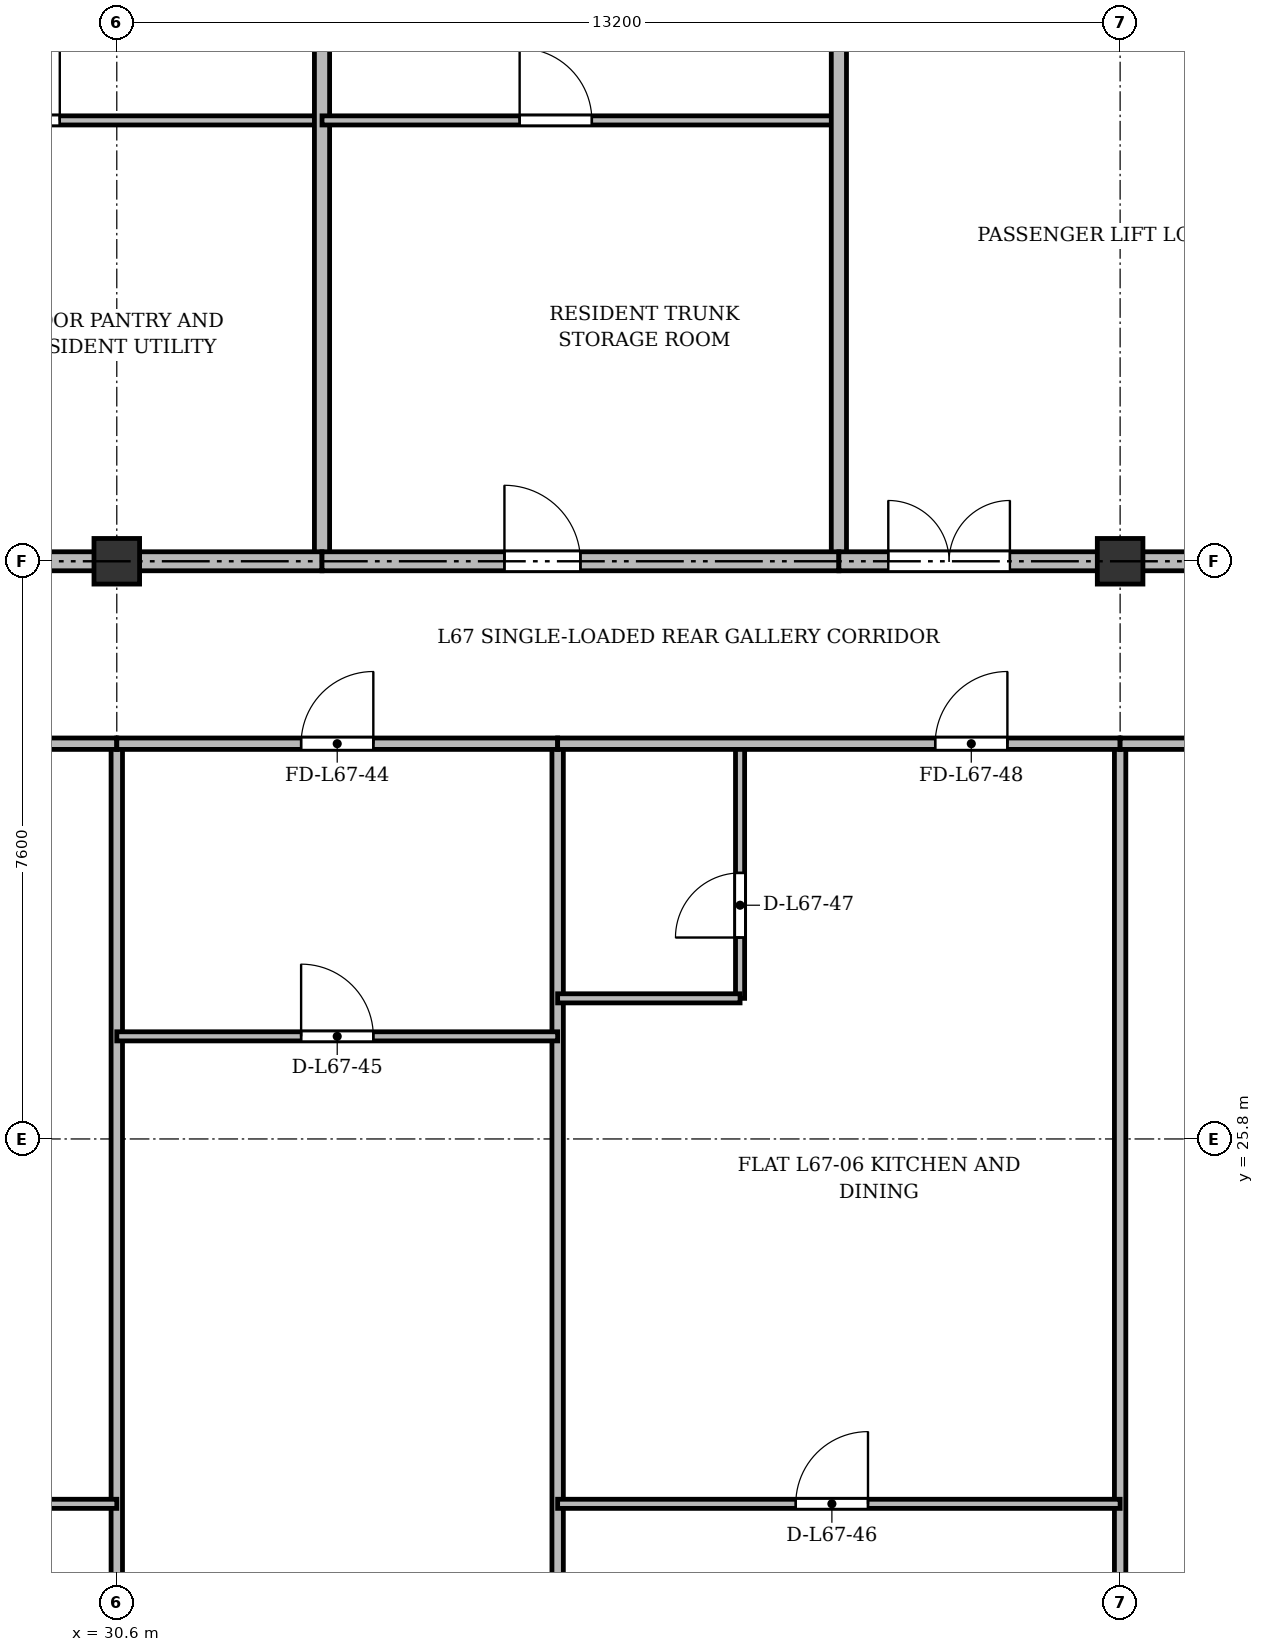
"""IFC4 building model, lengths in metres.
Left out: names, types, materials, properties, quantities, classifications, styles, units other than length and angle.
Written with IfcOpenShell. Run it as: python <this file> out.ifc"""

import sys

from ifc_helpers import new_model, si_unit, direction, frame, frame_2d, origin, origin_2d, place, context, subcontext, project, spatial, rectangle, extrude, source, transform, mapped, element, fill, save


model = new_model("IFC4")
c1 = context("Model", 3, precision=1e-05, world=origin(), true_north=direction((0.0, 1.0)))
c2 = subcontext(c1, "Body", "Model", "MODEL_VIEW")
j1 = project(units=[si_unit("LENGTHUNIT", "METRE"), si_unit("PLANEANGLEUNIT", "RADIAN")], contexts=[c1])
p1 = place(None, origin())
s1 = spatial("IfcSite", under=j1, at=p1, CompositionType="ELEMENT")
p2 = place(p1, origin())
s2 = spatial("IfcBuilding", under=s1, at=p2, CompositionType="ELEMENT")
p3 = place(p2, frame((0.0, 0.0, 259.5)))
s3 = spatial("IfcBuildingStorey", under=s2, at=p3, CompositionType="ELEMENT", Elevation=259.5)
m1 = source(origin(), c2, "Body", "SweptSolid", [
    extrude(rectangle(XDim=0.6, YDim=0.6, at=origin_2d()), origin(), (0.0, 0.0, 1.0), 3.6),
])
for number, where, z_axis, x_axis in (
    (1, (30.6, 33.4, 0.0), (0.0, 0.0, 1.0), (1.0, 0.0, 0.0)),
    (2, (43.8, 33.4, 0.0), (0.0, 0.0, 1.0), (1.0, 0.0, 0.0)),
):
    element("IfcColumn", number, at=place(p3, frame(where, z_axis=z_axis, x_axis=x_axis)), inside=s3, PredefinedType="COLUMN", context=c2, shape_type="MappedRepresentation", body=[
        mapped(m1, transform((0.0, 0.0, 0.0), x_axis=(1.0, 0.0, 0.0), y_axis=(0.0, 1.0, 0.0), z_axis=(0.0, 0.0, 1.0), scale=1.0)),
    ])
p4 = place(p3, frame((26.3, 39.2, 0.0), z_axis=(0.0, 0.0, 1.0), x_axis=(1.0, 0.0, 0.0)))
e3 = element("IfcWall", 3, at=p4, inside=s3, PredefinedType="PARTITIONING", context=c2, shape_type="SweptSolid", body=[
    extrude(rectangle(XDim=7.0, YDim=0.12, at=frame_2d((3.5, 0.0))), origin(), (0.0, 0.0, 1.0), 2.87),
])
p5 = place(p4, frame((2.6, 0.0, 0.0)))
e4 = element("IfcOpeningElement", 4, at=p5, cuts=e3, PredefinedType="OPENING", context=c2, shape_type="SweptSolid", body=[
    extrude(rectangle(XDim=0.95, YDim=2.15, at=frame_2d((0.475, 1.075))), frame((0.0, 0.07, 0.0), z_axis=(0.0, -1.0, 0.0), x_axis=(1.0, 0.0, 0.0)), (0.0, 0.0, 1.0), 0.14),
])
p6 = place(p3, frame((33.3, 33.4, 0.0), z_axis=(0.0, 0.0, 1.0), x_axis=(0.0, 1.0, 0.0)))
e5 = element("IfcWall", 5, at=p6, inside=s3, PredefinedType="SOLIDWALL", context=c2, shape_type="SweptSolid", body=[
    extrude(rectangle(XDim=11.3, YDim=0.2, at=frame_2d((5.65, 0.0))), origin(), (0.0, 0.0, 1.0), 2.92),
])
p7 = place(p3, frame((33.3, 39.2, 0.0), z_axis=(0.0, 0.0, 1.0), x_axis=(1.0, 0.0, 0.0)))
e6 = element("IfcWall", 6, at=p7, inside=s3, PredefinedType="PARTITIONING", context=c2, shape_type="SweptSolid", body=[
    extrude(rectangle(XDim=6.8, YDim=0.12, at=frame_2d((3.4, 0.0))), origin(), (0.0, 0.0, 1.0), 3.37),
])
p8 = place(p7, frame((2.6, 0.0, 0.0)))
e7 = element("IfcOpeningElement", 7, at=p8, cuts=e6, PredefinedType="OPENING", context=c2, shape_type="SweptSolid", body=[
    extrude(rectangle(XDim=0.95, YDim=2.15, at=frame_2d((0.475, 1.075))), frame((0.0, 0.07, 0.0), z_axis=(0.0, -1.0, 0.0), x_axis=(1.0, 0.0, 0.0)), (0.0, 0.0, 1.0), 0.14),
])
p9 = place(p3, frame((40.1, 33.4, 0.0), z_axis=(0.0, 0.0, 1.0), x_axis=(0.0, 1.0, 0.0)))
e8 = element("IfcWall", 8, at=p9, inside=s3, PredefinedType="SOLIDWALL", context=c2, shape_type="SweptSolid", body=[
    extrude(rectangle(XDim=8.0, YDim=0.2, at=frame_2d((4.0, 0.0))), origin(), (0.0, 0.0, 1.0), 2.92),
])
p10 = place(p3, frame((26.3, 33.4, 0.0), z_axis=(0.0, 0.0, 1.0), x_axis=(1.0, 0.0, 0.0)))
e9 = element("IfcWall", 9, at=p10, inside=s3, PredefinedType="PARTITIONING", context=c2, shape_type="SweptSolid", body=[
    extrude(rectangle(XDim=7.0, YDim=0.25, at=frame_2d((3.5, 0.0))), origin(), (0.0, 0.0, 1.0), 2.92),
])
p11 = place(p10, frame((1.35, 0.0, 0.0)))
e10 = element("IfcOpeningElement", 10, at=p11, cuts=e9, PredefinedType="OPENING", context=c2, shape_type="SweptSolid", body=[
    extrude(rectangle(XDim=0.95, YDim=2.15, at=frame_2d((0.475, 1.075))), frame((0.0, 0.135, 0.0), z_axis=(0.0, -1.0, 0.0), x_axis=(1.0, 0.0, 0.0)), (0.0, 0.0, 1.0), 0.27),
])
p12 = place(p3, frame((33.3, 33.4, 0.0), z_axis=(0.0, 0.0, 1.0), x_axis=(1.0, 0.0, 0.0)))
e11 = element("IfcWall", 11, at=p12, inside=s3, PredefinedType="PARTITIONING", context=c2, shape_type="SweptSolid", body=[
    extrude(rectangle(XDim=6.8, YDim=0.25, at=frame_2d((3.4, 0.0))), origin(), (0.0, 0.0, 1.0), 2.92),
])
p13 = place(p12, frame((2.4, 0.0, 0.0)))
e12 = element("IfcOpeningElement", 12, at=p13, cuts=e11, PredefinedType="OPENING", context=c2, shape_type="SweptSolid", body=[
    extrude(rectangle(XDim=1.0, YDim=2.15, at=frame_2d((0.5, 1.075))), frame((0.0, 0.135, 0.0), z_axis=(0.0, -1.0, 0.0), x_axis=(1.0, 0.0, 0.0)), (0.0, 0.0, 1.0), 0.27),
])
p14 = place(p3, frame((40.1, 33.4, 0.0), z_axis=(0.0, 0.0, 1.0), x_axis=(1.0, 0.0, 0.0)))
e13 = element("IfcWall", 13, at=p14, inside=s3, PredefinedType="PARTITIONING", context=c2, shape_type="SweptSolid", body=[
    extrude(rectangle(XDim=7.05, YDim=0.25, at=frame_2d((3.525, 0.0))), origin(), (0.0, 0.0, 1.0), 2.92),
])
p15 = place(p14, frame((0.65, 0.0, 0.0)))
e14 = element("IfcOpeningElement", 14, at=p15, cuts=e13, PredefinedType="OPENING", context=c2, shape_type="SweptSolid", body=[
    extrude(rectangle(XDim=1.6, YDim=2.2, at=frame_2d((0.8, 1.1))), frame((0.0, 0.135, 0.0), z_axis=(0.0, -1.0, 0.0), x_axis=(1.0, 0.0, 0.0)), (0.0, 0.0, 1.0), 0.27),
])
p16 = place(p3, frame((30.6, 3.725, 0.0), z_axis=(0.0, 0.0, 1.0), x_axis=(0.0, 1.0, 0.0)))
e15 = element("IfcWall", 15, at=p16, inside=s3, PredefinedType="PARTITIONING", context=c2, shape_type="SweptSolid", body=[
    extrude(rectangle(XDim=27.275, YDim=0.15, at=frame_2d((13.637, 0.0))), origin(), (0.0, 0.0, 1.0), 2.87),
])
p17 = place(p3, frame((36.4, 3.725, 0.0), z_axis=(0.0, 0.0, 1.0), x_axis=(0.0, 1.0, 0.0)))
e16 = element("IfcWall", 16, at=p17, inside=s3, PredefinedType="PARTITIONING", context=c2, shape_type="SweptSolid", body=[
    extrude(rectangle(XDim=27.275, YDim=0.15, at=frame_2d((13.637, 0.0))), origin(), (0.0, 0.0, 1.0), 2.92),
])
p18 = place(p3, frame((43.8, 3.725, 0.0), z_axis=(0.0, 0.0, 1.0), x_axis=(0.0, 1.0, 0.0)))
e17 = element("IfcWall", 17, at=p18, inside=s3, PredefinedType="PARTITIONING", context=c2, shape_type="SweptSolid", body=[
    extrude(rectangle(XDim=27.275, YDim=0.15, at=frame_2d((13.637, 0.0))), origin(), (0.0, 0.0, 1.0), 2.87),
])
p19 = place(p3, frame((23.4, 21.0, 0.0), z_axis=(0.0, 0.0, 1.0), x_axis=(1.0, 0.0, 0.0)))
e18 = element("IfcWall", 18, at=p19, inside=s3, PredefinedType="PARTITIONING", context=c2, shape_type="SweptSolid", body=[
    extrude(rectangle(XDim=7.2, YDim=0.12, at=frame_2d((3.6, 0.0))), origin(), (0.0, 0.0, 1.0), 2.87),
])
p20 = place(p19, frame((3.125, 0.0, 0.0)))
e19 = element("IfcOpeningElement", 19, at=p20, cuts=e18, PredefinedType="OPENING", context=c2, shape_type="SweptSolid", body=[
    extrude(rectangle(XDim=0.95, YDim=2.15, at=frame_2d((0.475, 1.075))), frame((0.0, 0.07, 0.0), z_axis=(0.0, -1.0, 0.0), x_axis=(1.0, 0.0, 0.0)), (0.0, 0.0, 1.0), 0.14),
])
p21 = place(p3, frame((23.4, 31.0, 0.0), z_axis=(0.0, 0.0, 1.0), x_axis=(1.0, 0.0, 0.0)))
e20 = element("IfcWall", 20, at=p21, inside=s3, PredefinedType="PARTITIONING", context=c2, shape_type="SweptSolid", body=[
    extrude(rectangle(XDim=7.2, YDim=0.15, at=frame_2d((3.6, 0.0))), origin(), (0.0, 0.0, 1.0), 2.87),
])
p22 = place(p21, frame((4.706, 0.0, 0.0)))
e21 = element("IfcOpeningElement", 21, at=p22, cuts=e20, PredefinedType="OPENING", context=c2, shape_type="SweptSolid", body=[
    extrude(rectangle(XDim=0.95, YDim=2.15, at=frame_2d((0.475, 1.075))), frame((0.0, 0.085, 0.0), z_axis=(0.0, -1.0, 0.0), x_axis=(1.0, 0.0, 0.0)), (0.0, 0.0, 1.0), 0.17),
])
p23 = place(p3, frame((30.6, 31.0, 0.0), z_axis=(0.0, 0.0, 1.0), x_axis=(1.0, 0.0, 0.0)))
e22 = element("IfcWall", 22, at=p23, inside=s3, PredefinedType="PARTITIONING", context=c2, shape_type="SweptSolid", body=[
    extrude(rectangle(XDim=5.8, YDim=0.15, at=frame_2d((2.9, 0.0))), origin(), (0.0, 0.0, 1.0), 2.87),
])
p24 = place(p23, frame((2.425, 0.0, 0.0)))
e23 = element("IfcOpeningElement", 23, at=p24, cuts=e22, PredefinedType="OPENING", context=c2, shape_type="SweptSolid", body=[
    extrude(rectangle(XDim=0.95, YDim=2.15, at=frame_2d((0.475, 1.075))), frame((0.0, 0.085, 0.0), z_axis=(0.0, -1.0, 0.0), x_axis=(1.0, 0.0, 0.0)), (0.0, 0.0, 1.0), 0.17),
])
p25 = place(p3, frame((30.6, 27.15, 0.0), z_axis=(0.0, 0.0, 1.0), x_axis=(1.0, 0.0, 0.0)))
e24 = element("IfcWall", 24, at=p25, inside=s3, PredefinedType="PARTITIONING", context=c2, shape_type="SweptSolid", body=[
    extrude(rectangle(XDim=5.8, YDim=0.12, at=frame_2d((2.9, 0.0))), origin(), (0.0, 0.0, 1.0), 2.87),
])
p26 = place(p25, frame((2.425, 0.0, 0.0)))
e25 = element("IfcOpeningElement", 25, at=p26, cuts=e24, PredefinedType="OPENING", context=c2, shape_type="SweptSolid", body=[
    extrude(rectangle(XDim=0.95, YDim=2.15, at=frame_2d((0.475, 1.075))), frame((0.0, 0.07, 0.0), z_axis=(0.0, -1.0, 0.0), x_axis=(1.0, 0.0, 0.0)), (0.0, 0.0, 1.0), 0.14),
])
p27 = place(p3, frame((36.4, 21.0, 0.0), z_axis=(0.0, 0.0, 1.0), x_axis=(1.0, 0.0, 0.0)))
e26 = element("IfcWall", 26, at=p27, inside=s3, PredefinedType="PARTITIONING", context=c2, shape_type="SweptSolid", body=[
    extrude(rectangle(XDim=7.4, YDim=0.12, at=frame_2d((3.7, 0.0))), origin(), (0.0, 0.0, 1.0), 2.87),
])
p28 = place(p27, frame((3.133, 0.0, 0.0)))
e27 = element("IfcOpeningElement", 27, at=p28, cuts=e26, PredefinedType="OPENING", context=c2, shape_type="SweptSolid", body=[
    extrude(rectangle(XDim=0.95, YDim=2.15, at=frame_2d((0.475, 1.075))), frame((0.0, 0.07, 0.0), z_axis=(0.0, -1.0, 0.0), x_axis=(1.0, 0.0, 0.0)), (0.0, 0.0, 1.0), 0.14),
])
p29 = place(p3, frame((38.8, 27.65, 0.0), z_axis=(0.0, 0.0, 1.0), x_axis=(0.0, 1.0, 0.0)))
e28 = element("IfcWall", 28, at=p29, inside=s3, PredefinedType="PARTITIONING", context=c2, shape_type="SweptSolid", body=[
    extrude(rectangle(XDim=3.35, YDim=0.12, at=frame_2d((1.675, 0.0))), origin(), (0.0, 0.0, 1.0), 3.37),
])
p30 = place(p29, frame((0.8, 0.0, 0.0)))
e29 = element("IfcOpeningElement", 29, at=p30, cuts=e28, PredefinedType="OPENING", context=c2, shape_type="SweptSolid", body=[
    extrude(rectangle(XDim=0.85, YDim=2.1, at=frame_2d((0.425, 1.05))), frame((0.0, 0.07, 0.0), z_axis=(0.0, -1.0, 0.0), x_axis=(1.0, 0.0, 0.0)), (0.0, 0.0, 1.0), 0.14),
])
p31 = place(p3, frame((36.4, 27.65, 0.0), z_axis=(0.0, 0.0, 1.0), x_axis=(1.0, 0.0, 0.0)))
e30 = element("IfcWall", 30, at=p31, inside=s3, PredefinedType="PARTITIONING", context=c2, shape_type="SweptSolid", body=[
    extrude(rectangle(XDim=2.4, YDim=0.12, at=frame_2d((1.2, 0.0))), origin(), (0.0, 0.0, 1.0), 3.37),
])
p32 = place(p3, frame((36.4, 31.0, 0.0), z_axis=(0.0, 0.0, 1.0), x_axis=(1.0, 0.0, 0.0)))
e31 = element("IfcWall", 31, at=p32, inside=s3, PredefinedType="PARTITIONING", context=c2, shape_type="SweptSolid", body=[
    extrude(rectangle(XDim=7.4, YDim=0.15, at=frame_2d((3.7, 0.0))), origin(), (0.0, 0.0, 1.0), 2.87),
])
p33 = place(p32, frame((4.967, 0.0, 0.0)))
e32 = element("IfcOpeningElement", 32, at=p33, cuts=e31, PredefinedType="OPENING", context=c2, shape_type="SweptSolid", body=[
    extrude(rectangle(XDim=0.95, YDim=2.15, at=frame_2d((0.475, 1.075))), frame((0.0, 0.085, 0.0), z_axis=(0.0, -1.0, 0.0), x_axis=(1.0, 0.0, 0.0)), (0.0, 0.0, 1.0), 0.17),
])
p34 = place(p3, frame((43.8, 31.0, 0.0), z_axis=(0.0, 0.0, 1.0), x_axis=(1.0, 0.0, 0.0)))
e33 = element("IfcWall", 33, at=p34, inside=s3, PredefinedType="PARTITIONING", context=c2, shape_type="SweptSolid", body=[
    extrude(rectangle(XDim=7.2, YDim=0.15, at=frame_2d((3.6, 0.0))), origin(), (0.0, 0.0, 1.0), 2.87),
])
p35 = place(p34, frame((3.125, 0.0, 0.0)))
e34 = element("IfcOpeningElement", 34, at=p35, cuts=e33, PredefinedType="OPENING", context=c2, shape_type="SweptSolid", body=[
    extrude(rectangle(XDim=0.95, YDim=2.15, at=frame_2d((0.475, 1.075))), frame((0.0, 0.085, 0.0), z_axis=(0.0, -1.0, 0.0), x_axis=(1.0, 0.0, 0.0)), (0.0, 0.0, 1.0), 0.17),
])
m2 = source(origin(), c2, "Body", "SweptSolid", [
    extrude(rectangle(XDim=0.95, YDim=2.15, at=frame_2d((0.475, 1.075))), frame((0.0, 0.025, 0.0), z_axis=(0.0, -1.0, 0.0), x_axis=(1.0, 0.0, 0.0)), (0.0, 0.0, 1.0), 0.05),
])
p36 = place(p5, origin())
e35 = element("IfcDoor", 35, at=p36, inside=s3, OperationType="SINGLE_SWING_RIGHT", PredefinedType="DOOR", context=c2, shape_type="MappedRepresentation", body=[
    mapped(m2, transform((0.0, 0.0, 0.0), x_axis=(1.0, 0.0, 0.0), y_axis=(0.0, 1.0, 0.0), z_axis=(0.0, 0.0, 1.0), scale=1.0)),
])
fill(e4, e35)
p37 = place(p8, origin())
e36 = element("IfcDoor", 36, at=p37, inside=s3, OperationType="SINGLE_SWING_LEFT", PredefinedType="DOOR", context=c2, shape_type="MappedRepresentation", body=[
    mapped(m2, transform((0.0, 0.0, 0.0), x_axis=(1.0, 0.0, 0.0), y_axis=(0.0, 1.0, 0.0), z_axis=(0.0, 0.0, 1.0), scale=1.0)),
])
fill(e7, e36)
m3 = source(origin(), c2, "Body", "SweptSolid", [
    extrude(rectangle(XDim=1.0, YDim=2.15, at=frame_2d((0.5, 1.075))), frame((0.0, 0.025, 0.0), z_axis=(0.0, -1.0, 0.0), x_axis=(1.0, 0.0, 0.0)), (0.0, 0.0, 1.0), 0.05),
])
p38 = place(p13, origin())
e37 = element("IfcDoor", 37, at=p38, inside=s3, OperationType="SINGLE_SWING_LEFT", PredefinedType="DOOR", context=c2, shape_type="MappedRepresentation", body=[
    mapped(m3, transform((0.0, 0.0, 0.0), x_axis=(1.0, 0.0, 0.0), y_axis=(0.0, 1.0, 0.0), z_axis=(0.0, 0.0, 1.0), scale=1.0)),
])
fill(e12, e37)
m4 = source(origin(), c2, "Body", "SweptSolid", [
    extrude(rectangle(XDim=1.6, YDim=2.2, at=frame_2d((0.8, 1.1))), frame((0.0, 0.025, 0.0), z_axis=(0.0, -1.0, 0.0), x_axis=(1.0, 0.0, 0.0)), (0.0, 0.0, 1.0), 0.05),
])
p39 = place(p15, origin())
e38 = element("IfcDoor", 38, at=p39, inside=s3, OperationType="DOUBLE_DOOR_SINGLE_SWING", PredefinedType="DOOR", context=c2, shape_type="MappedRepresentation", body=[
    mapped(m4, transform((0.0, 0.0, 0.0), x_axis=(1.0, 0.0, 0.0), y_axis=(0.0, 1.0, 0.0), z_axis=(0.0, 0.0, 1.0), scale=1.0)),
])
fill(e14, e38)
p40 = place(p24, origin())
e39 = element("IfcDoor", 39, at=p40, inside=s3, OperationType="SINGLE_SWING_RIGHT", PredefinedType="DOOR", context=c2, shape_type="MappedRepresentation", body=[
    mapped(m2, transform((0.0, 0.0, 0.0), x_axis=(1.0, 0.0, 0.0), y_axis=(0.0, 1.0, 0.0), z_axis=(0.0, 0.0, 1.0), scale=1.0)),
])
fill(e23, e39)
p41 = place(p26, origin())
e40 = element("IfcDoor", 40, at=p41, inside=s3, OperationType="SINGLE_SWING_LEFT", PredefinedType="DOOR", context=c2, shape_type="MappedRepresentation", body=[
    mapped(m2, transform((0.0, 0.0, 0.0), x_axis=(1.0, 0.0, 0.0), y_axis=(0.0, 1.0, 0.0), z_axis=(0.0, 0.0, 1.0), scale=1.0)),
])
fill(e25, e40)
p42 = place(p28, origin())
e41 = element("IfcDoor", 41, at=p42, inside=s3, OperationType="SINGLE_SWING_RIGHT", PredefinedType="DOOR", context=c2, shape_type="MappedRepresentation", body=[
    mapped(m2, transform((0.0, 0.0, 0.0), x_axis=(1.0, 0.0, 0.0), y_axis=(0.0, 1.0, 0.0), z_axis=(0.0, 0.0, 1.0), scale=1.0)),
])
fill(e27, e41)
m5 = source(origin(), c2, "Body", "SweptSolid", [
    extrude(rectangle(XDim=0.85, YDim=2.1, at=frame_2d((0.425, 1.05))), frame((0.0, 0.025, 0.0), z_axis=(0.0, -1.0, 0.0), x_axis=(1.0, 0.0, 0.0)), (0.0, 0.0, 1.0), 0.05),
])
p43 = place(p30, origin())
e42 = element("IfcDoor", 42, at=p43, inside=s3, OperationType="SINGLE_SWING_LEFT", PredefinedType="DOOR", context=c2, shape_type="MappedRepresentation", body=[
    mapped(m5, transform((0.0, 0.0, 0.0), x_axis=(1.0, 0.0, 0.0), y_axis=(0.0, 1.0, 0.0), z_axis=(0.0, 0.0, 1.0), scale=1.0)),
])
fill(e29, e42)
p44 = place(p33, origin())
e43 = element("IfcDoor", 43, at=p44, inside=s3, OperationType="SINGLE_SWING_RIGHT", PredefinedType="DOOR", context=c2, shape_type="MappedRepresentation", body=[
    mapped(m2, transform((0.0, 0.0, 0.0), x_axis=(1.0, 0.0, 0.0), y_axis=(0.0, 1.0, 0.0), z_axis=(0.0, 0.0, 1.0), scale=1.0)),
])
fill(e32, e43)
save(model, sys.argv[1])
